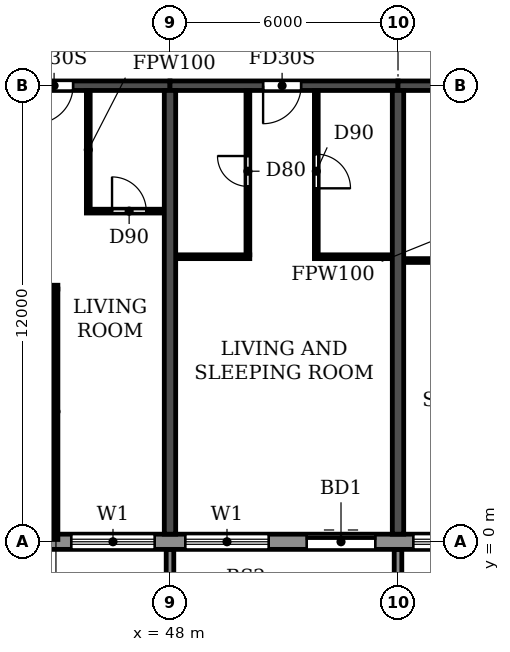
"""IFC4 building model, lengths in metres.
Left out: names, types, materials, properties, quantities, classifications, styles, units other than length and angle.
Written with IfcOpenShell. Run it as: python <this file> out.ifc"""

import sys

from ifc_helpers import new_model, si_unit, direction, frame, frame_2d, origin, place, context, subcontext, project, spatial, polyline, rectangle, outline, extrude, source, transform, mapped, element, fill, save


model = new_model("IFC4")
c1 = context("Model", 3, precision=1e-05, world=origin(), true_north=direction((0.0, 1.0)))
c2 = subcontext(c1, "Body", "Model", "MODEL_VIEW")
j1 = project(units=[si_unit("LENGTHUNIT", "METRE"), si_unit("PLANEANGLEUNIT", "RADIAN")], contexts=[c1])
p1 = place(None, origin())
s1 = spatial("IfcSite", under=j1, at=p1, CompositionType="ELEMENT")
p2 = place(p1, origin())
s2 = spatial("IfcBuilding", under=s1, at=p2, CompositionType="ELEMENT")
p3 = place(p2, frame((0.0, 0.0, 142.2)))
s3 = spatial("IfcBuildingStorey", under=s2, at=p3, CompositionType="ELEMENT", Elevation=142.2)
for number, where, z_axis, x_axis in (
    (1, (48.0, 0.2, 0.0), (0.0, 0.0, 1.0), (0.0, 1.0, 0.0)),
    (2, (54.0, 0.2, 0.0), (0.0, 0.0, 1.0), (0.0, 1.0, 0.0)),
):
    element("IfcWall", number, at=place(p3, frame(where, z_axis=z_axis, x_axis=x_axis)), inside=s3, PredefinedType="SHEAR", context=c2, shape_type="SweptSolid", body=[
        extrude(rectangle(XDim=11.675, YDim=0.3, at=frame_2d((5.837, 0.0))), origin(), (0.0, 0.0, 1.0), 3.07),
    ])
p4 = place(p3, frame((42.0, 12.0, 0.0), z_axis=(0.0, 0.0, 1.0), x_axis=(1.0, 0.0, 0.0)))
e3 = element("IfcWall", 3, at=p4, inside=s3, PredefinedType="SHEAR", context=c2, shape_type="SweptSolid", body=[
    extrude(rectangle(XDim=6.0, YDim=0.25, at=frame_2d((3.0, 0.0))), origin(), (0.0, 0.0, 1.0), 2.47),
])
p5 = place(p4, frame((2.45, 0.0, 0.0)))
e4 = element("IfcOpeningElement", 4, at=p5, cuts=e3, PredefinedType="OPENING", context=c2, shape_type="SweptSolid", body=[
    extrude(rectangle(XDim=1.0, YDim=2.1, at=frame_2d((0.5, 1.05))), frame((0.0, 0.135, 0.0), z_axis=(0.0, -1.0, 0.0), x_axis=(1.0, 0.0, 0.0)), (0.0, 0.0, 1.0), 0.27),
])
p6 = place(p3, frame((48.0, 12.0, 0.0), z_axis=(0.0, 0.0, 1.0), x_axis=(1.0, 0.0, 0.0)))
e5 = element("IfcWall", 5, at=p6, inside=s3, PredefinedType="SHEAR", context=c2, shape_type="SweptSolid", body=[
    extrude(rectangle(XDim=6.0, YDim=0.25, at=frame_2d((3.0, 0.0))), origin(), (0.0, 0.0, 1.0), 2.47),
])
p7 = place(p6, frame((2.45, 0.0, 0.0)))
e6 = element("IfcOpeningElement", 6, at=p7, cuts=e5, PredefinedType="OPENING", context=c2, shape_type="SweptSolid", body=[
    extrude(rectangle(XDim=1.0, YDim=2.1, at=frame_2d((0.5, 1.05))), frame((0.0, 0.135, 0.0), z_axis=(0.0, -1.0, 0.0), x_axis=(1.0, 0.0, 0.0)), (0.0, 0.0, 1.0), 0.27),
])
p8 = place(p3, frame((54.0, 12.0, 0.0), z_axis=(0.0, 0.0, 1.0), x_axis=(1.0, 0.0, 0.0)))
e7 = element("IfcWall", 7, at=p8, inside=s3, PredefinedType="SHEAR", context=c2, shape_type="SweptSolid", body=[
    extrude(rectangle(XDim=6.0, YDim=0.25, at=frame_2d((3.0, 0.0))), origin(), (0.0, 0.0, 1.0), 2.47),
])
p9 = place(p8, frame((2.45, 0.0, 0.0)))
e8 = element("IfcOpeningElement", 8, at=p9, cuts=e7, PredefinedType="OPENING", context=c2, shape_type="SweptSolid", body=[
    extrude(rectangle(XDim=1.0, YDim=2.1, at=frame_2d((0.5, 1.05))), frame((0.0, 0.135, 0.0), z_axis=(0.0, -1.0, 0.0), x_axis=(1.0, 0.0, 0.0)), (0.0, 0.0, 1.0), 0.27),
])
p10 = place(p3, frame((16.683, 0.0, 0.0), z_axis=(0.0, 0.0, 1.0), x_axis=(1.0, 0.0, 0.0)))
e9 = element("IfcWall", 9, at=p10, inside=s3, PredefinedType="STANDARD", context=c2, shape_type="SweptSolid", body=[
    extrude(rectangle(XDim=68.634, YDim=0.4, at=frame_2d((34.317, 0.0))), origin(), (0.0, 0.0, 1.0), 3.07),
])
p11 = place(p10, frame((1.717, 0.0, 0.9)))
e10 = element("IfcOpeningElement", 10, at=p11, cuts=e9, PredefinedType="OPENING", context=c2, shape_type="SweptSolid", body=[
    extrude(rectangle(XDim=2.2, YDim=1.5, at=frame_2d((1.1, 0.75))), frame((0.0, 0.21, 0.0), z_axis=(0.0, -1.0, 0.0), x_axis=(1.0, 0.0, 0.0)), (0.0, 0.0, 1.0), 0.42),
])
p12 = place(p10, frame((4.717, 0.0, 0.9)))
e11 = element("IfcOpeningElement", 11, at=p12, cuts=e9, PredefinedType="OPENING", context=c2, shape_type="SweptSolid", body=[
    extrude(rectangle(XDim=2.2, YDim=1.5, at=frame_2d((1.1, 0.75))), frame((0.0, 0.21, 0.0), z_axis=(0.0, -1.0, 0.0), x_axis=(1.0, 0.0, 0.0)), (0.0, 0.0, 1.0), 0.42),
])
p13 = place(p10, frame((7.717, 0.0, 0.9)))
e12 = element("IfcOpeningElement", 12, at=p13, cuts=e9, PredefinedType="OPENING", context=c2, shape_type="SweptSolid", body=[
    extrude(rectangle(XDim=2.2, YDim=1.5, at=frame_2d((1.1, 0.75))), frame((0.0, 0.21, 0.0), z_axis=(0.0, -1.0, 0.0), x_axis=(1.0, 0.0, 0.0)), (0.0, 0.0, 1.0), 0.42),
])
p14 = place(p10, frame((10.717, 0.0, 0.9)))
e13 = element("IfcOpeningElement", 13, at=p14, cuts=e9, PredefinedType="OPENING", context=c2, shape_type="SweptSolid", body=[
    extrude(rectangle(XDim=2.2, YDim=1.5, at=frame_2d((1.1, 0.75))), frame((0.0, 0.21, 0.0), z_axis=(0.0, -1.0, 0.0), x_axis=(1.0, 0.0, 0.0)), (0.0, 0.0, 1.0), 0.42),
])
p15 = place(p10, frame((13.717, 0.0, 0.9)))
e14 = element("IfcOpeningElement", 14, at=p15, cuts=e9, PredefinedType="OPENING", context=c2, shape_type="SweptSolid", body=[
    extrude(rectangle(XDim=2.2, YDim=1.5, at=frame_2d((1.1, 0.75))), frame((0.0, 0.21, 0.0), z_axis=(0.0, -1.0, 0.0), x_axis=(1.0, 0.0, 0.0)), (0.0, 0.0, 1.0), 0.42),
])
p16 = place(p10, frame((16.717, 0.0, 0.9)))
e15 = element("IfcOpeningElement", 15, at=p16, cuts=e9, PredefinedType="OPENING", context=c2, shape_type="SweptSolid", body=[
    extrude(rectangle(XDim=2.2, YDim=1.5, at=frame_2d((1.1, 0.75))), frame((0.0, 0.21, 0.0), z_axis=(0.0, -1.0, 0.0), x_axis=(1.0, 0.0, 0.0)), (0.0, 0.0, 1.0), 0.42),
])
p17 = place(p10, frame((19.717, 0.0, 0.9)))
e16 = element("IfcOpeningElement", 16, at=p17, cuts=e9, PredefinedType="OPENING", context=c2, shape_type="SweptSolid", body=[
    extrude(rectangle(XDim=2.2, YDim=1.5, at=frame_2d((1.1, 0.75))), frame((0.0, 0.21, 0.0), z_axis=(0.0, -1.0, 0.0), x_axis=(1.0, 0.0, 0.0)), (0.0, 0.0, 1.0), 0.42),
])
p18 = place(p10, frame((22.717, 0.0, 0.9)))
e17 = element("IfcOpeningElement", 17, at=p18, cuts=e9, PredefinedType="OPENING", context=c2, shape_type="SweptSolid", body=[
    extrude(rectangle(XDim=2.2, YDim=1.5, at=frame_2d((1.1, 0.75))), frame((0.0, 0.21, 0.0), z_axis=(0.0, -1.0, 0.0), x_axis=(1.0, 0.0, 0.0)), (0.0, 0.0, 1.0), 0.42),
])
p19 = place(p10, frame((25.717, 0.0, 0.9)))
e18 = element("IfcOpeningElement", 18, at=p19, cuts=e9, PredefinedType="OPENING", context=c2, shape_type="SweptSolid", body=[
    extrude(rectangle(XDim=2.2, YDim=1.5, at=frame_2d((1.1, 0.75))), frame((0.0, 0.21, 0.0), z_axis=(0.0, -1.0, 0.0), x_axis=(1.0, 0.0, 0.0)), (0.0, 0.0, 1.0), 0.42),
])
p20 = place(p10, frame((28.717, 0.0, 0.9)))
e19 = element("IfcOpeningElement", 19, at=p20, cuts=e9, PredefinedType="OPENING", context=c2, shape_type="SweptSolid", body=[
    extrude(rectangle(XDim=2.2, YDim=1.5, at=frame_2d((1.1, 0.75))), frame((0.0, 0.21, 0.0), z_axis=(0.0, -1.0, 0.0), x_axis=(1.0, 0.0, 0.0)), (0.0, 0.0, 1.0), 0.42),
])
p21 = place(p10, frame((31.717, 0.0, 0.9)))
e20 = element("IfcOpeningElement", 20, at=p21, cuts=e9, PredefinedType="OPENING", context=c2, shape_type="SweptSolid", body=[
    extrude(rectangle(XDim=2.2, YDim=1.5, at=frame_2d((1.1, 0.75))), frame((0.0, 0.21, 0.0), z_axis=(0.0, -1.0, 0.0), x_axis=(1.0, 0.0, 0.0)), (0.0, 0.0, 1.0), 0.42),
])
p22 = place(p10, frame((34.917, 0.0, 0.0)))
e21 = element("IfcOpeningElement", 21, at=p22, cuts=e9, PredefinedType="OPENING", context=c2, shape_type="SweptSolid", body=[
    extrude(rectangle(XDim=1.8, YDim=2.4, at=frame_2d((0.9, 1.2))), frame((0.0, 0.21, 0.0), z_axis=(0.0, -1.0, 0.0), x_axis=(1.0, 0.0, 0.0)), (0.0, 0.0, 1.0), 0.42),
])
p23 = place(p10, frame((37.717, 0.0, 0.9)))
e22 = element("IfcOpeningElement", 22, at=p23, cuts=e9, PredefinedType="OPENING", context=c2, shape_type="SweptSolid", body=[
    extrude(rectangle(XDim=2.2, YDim=1.5, at=frame_2d((1.1, 0.75))), frame((0.0, 0.21, 0.0), z_axis=(0.0, -1.0, 0.0), x_axis=(1.0, 0.0, 0.0)), (0.0, 0.0, 1.0), 0.42),
])
p24 = place(p10, frame((40.717, 0.0, 0.9)))
e23 = element("IfcOpeningElement", 23, at=p24, cuts=e9, PredefinedType="OPENING", context=c2, shape_type="SweptSolid", body=[
    extrude(rectangle(XDim=2.2, YDim=1.5, at=frame_2d((1.1, 0.75))), frame((0.0, 0.21, 0.0), z_axis=(0.0, -1.0, 0.0), x_axis=(1.0, 0.0, 0.0)), (0.0, 0.0, 1.0), 0.42),
])
p25 = place(p10, frame((43.717, 0.0, 0.9)))
e24 = element("IfcOpeningElement", 24, at=p25, cuts=e9, PredefinedType="OPENING", context=c2, shape_type="SweptSolid", body=[
    extrude(rectangle(XDim=2.2, YDim=1.5, at=frame_2d((1.1, 0.75))), frame((0.0, 0.21, 0.0), z_axis=(0.0, -1.0, 0.0), x_axis=(1.0, 0.0, 0.0)), (0.0, 0.0, 1.0), 0.42),
])
p26 = place(p10, frame((46.917, 0.0, 0.0)))
e25 = element("IfcOpeningElement", 25, at=p26, cuts=e9, PredefinedType="OPENING", context=c2, shape_type="SweptSolid", body=[
    extrude(rectangle(XDim=1.8, YDim=2.4, at=frame_2d((0.9, 1.2))), frame((0.0, 0.21, 0.0), z_axis=(0.0, -1.0, 0.0), x_axis=(1.0, 0.0, 0.0)), (0.0, 0.0, 1.0), 0.42),
])
p27 = place(p10, frame((49.717, 0.0, 0.9)))
e26 = element("IfcOpeningElement", 26, at=p27, cuts=e9, PredefinedType="OPENING", context=c2, shape_type="SweptSolid", body=[
    extrude(rectangle(XDim=2.2, YDim=1.5, at=frame_2d((1.1, 0.75))), frame((0.0, 0.21, 0.0), z_axis=(0.0, -1.0, 0.0), x_axis=(1.0, 0.0, 0.0)), (0.0, 0.0, 1.0), 0.42),
])
p28 = place(p10, frame((52.717, 0.0, 0.9)))
e27 = element("IfcOpeningElement", 27, at=p28, cuts=e9, PredefinedType="OPENING", context=c2, shape_type="SweptSolid", body=[
    extrude(rectangle(XDim=2.2, YDim=1.5, at=frame_2d((1.1, 0.75))), frame((0.0, 0.21, 0.0), z_axis=(0.0, -1.0, 0.0), x_axis=(1.0, 0.0, 0.0)), (0.0, 0.0, 1.0), 0.42),
])
p29 = place(p10, frame((55.717, 0.0, 0.9)))
e28 = element("IfcOpeningElement", 28, at=p29, cuts=e9, PredefinedType="OPENING", context=c2, shape_type="SweptSolid", body=[
    extrude(rectangle(XDim=2.2, YDim=1.5, at=frame_2d((1.1, 0.75))), frame((0.0, 0.21, 0.0), z_axis=(0.0, -1.0, 0.0), x_axis=(1.0, 0.0, 0.0)), (0.0, 0.0, 1.0), 0.42),
])
p30 = place(p10, frame((58.717, 0.0, 0.9)))
e29 = element("IfcOpeningElement", 29, at=p30, cuts=e9, PredefinedType="OPENING", context=c2, shape_type="SweptSolid", body=[
    extrude(rectangle(XDim=2.2, YDim=1.5, at=frame_2d((1.1, 0.75))), frame((0.0, 0.21, 0.0), z_axis=(0.0, -1.0, 0.0), x_axis=(1.0, 0.0, 0.0)), (0.0, 0.0, 1.0), 0.42),
])
p31 = place(p10, frame((61.717, 0.0, 0.9)))
e30 = element("IfcOpeningElement", 30, at=p31, cuts=e9, PredefinedType="OPENING", context=c2, shape_type="SweptSolid", body=[
    extrude(rectangle(XDim=2.2, YDim=1.5, at=frame_2d((1.1, 0.75))), frame((0.0, 0.21, 0.0), z_axis=(0.0, -1.0, 0.0), x_axis=(1.0, 0.0, 0.0)), (0.0, 0.0, 1.0), 0.42),
])
p32 = place(p10, frame((64.717, 0.0, 0.9)))
e31 = element("IfcOpeningElement", 31, at=p32, cuts=e9, PredefinedType="OPENING", context=c2, shape_type="SweptSolid", body=[
    extrude(rectangle(XDim=2.2, YDim=1.5, at=frame_2d((1.1, 0.75))), frame((0.0, 0.21, 0.0), z_axis=(0.0, -1.0, 0.0), x_axis=(1.0, 0.0, 0.0)), (0.0, 0.0, 1.0), 0.42),
])
m1 = source(origin(), c2, "Body", "SweptSolid", [
    extrude(outline(polyline([(0.0, 0.0), (0.2, 0.0), (0.2, 1.65), (0.0, 1.65), (0.0, 0.0)])), origin(), (0.0, 0.0, 1.0), 3.1),
])
for number, where in (
    (32, (47.9, -1.85, 0.0)),
    (33, (53.9, -1.85, 0.0)),
):
    element("IfcWall", number, at=place(p3, frame(where)), inside=s3, PredefinedType="STANDARD", context=c2, shape_type="MappedRepresentation", body=[
        mapped(m1, transform((0.0, 0.0, 0.0))),
    ])
p33 = place(p3, frame((42.16, 6.7, 0.0), z_axis=(0.0, 0.0, 1.0), x_axis=(1.0, 0.0, 0.0)))
e34 = element("IfcWall", 34, at=p33, inside=s3, PredefinedType="PARTITIONING", context=c2, shape_type="SweptSolid", body=[
    extrude(rectangle(XDim=2.89, YDim=0.1, at=frame_2d((1.445, 0.0))), origin(), (0.0, 0.0, 1.0), 3.07),
])
p34 = place(p33, frame((1.44, 0.0, 0.0)))
e35 = element("IfcOpeningElement", 35, at=p34, cuts=e34, PredefinedType="OPENING", context=c2, shape_type="SweptSolid", body=[
    extrude(rectangle(XDim=0.9, YDim=2.1, at=frame_2d((0.45, 1.05))), frame((0.0, 0.06, 0.0), z_axis=(0.0, -1.0, 0.0), x_axis=(1.0, 0.0, 0.0)), (0.0, 0.0, 1.0), 0.12),
])
for number, where, z_axis, x_axis in (
    (36, (54.16, 7.4, 0.0), (0.0, 0.0, 1.0), (1.0, 0.0, 0.0)),
    (37, (48.16, 7.5, 0.0), (0.0, 0.0, 1.0), (1.0, 0.0, 0.0)),
):
    element("IfcWall", number, at=place(p3, frame(where, z_axis=z_axis, x_axis=x_axis)), inside=s3, PredefinedType="PARTITIONING", context=c2, shape_type="SweptSolid", body=[
        extrude(rectangle(XDim=1.94, YDim=0.1, at=frame_2d((0.97, 0.0))), origin(), (0.0, 0.0, 1.0), 3.07),
    ])
p35 = place(p3, frame((51.8, 7.5, 0.0), z_axis=(0.0, 0.0, 1.0), x_axis=(1.0, 0.0, 0.0)))
e38 = element("IfcWall", 38, at=p35, inside=s3, PredefinedType="PARTITIONING", context=c2, shape_type="SweptSolid", body=[
    extrude(rectangle(XDim=2.04, YDim=0.1, at=frame_2d((1.02, 0.0))), origin(), (0.0, 0.0, 1.0), 3.07),
])
p36 = place(p3, frame((45.8, 8.7, 0.0), z_axis=(0.0, 0.0, 1.0), x_axis=(1.0, 0.0, 0.0)))
e39 = element("IfcWall", 39, at=p36, inside=s3, PredefinedType="PARTITIONING", context=c2, shape_type="SweptSolid", body=[
    extrude(rectangle(XDim=2.04, YDim=0.1, at=frame_2d((1.02, 0.0))), origin(), (0.0, 0.0, 1.0), 3.07),
])
p37 = place(p36, frame((0.675, 0.0, 0.0)))
e40 = element("IfcOpeningElement", 40, at=p37, cuts=e39, PredefinedType="OPENING", context=c2, shape_type="SweptSolid", body=[
    extrude(rectangle(XDim=0.9, YDim=2.1, at=frame_2d((0.45, 1.05))), frame((0.0, 0.06, 0.0), z_axis=(0.0, -1.0, 0.0), x_axis=(1.0, 0.0, 0.0)), (0.0, 0.0, 1.0), 0.12),
])
p38 = place(p3, frame((45.0, 0.06, 0.0), z_axis=(0.0, 0.0, 1.0), x_axis=(0.0, 1.0, 0.0)))
e41 = element("IfcWall", 41, at=p38, inside=s3, PredefinedType="PARTITIONING", context=c2, shape_type="SweptSolid", body=[
    extrude(rectangle(XDim=6.59, YDim=0.1, at=frame_2d((3.295, 0.0))), origin(), (0.0, 0.0, 1.0), 3.07),
])
p39 = place(p3, frame((45.85, 8.75, 0.0), z_axis=(0.0, 0.0, 1.0), x_axis=(0.0, 1.0, 0.0)))
e42 = element("IfcWall", 42, at=p39, inside=s3, PredefinedType="PARTITIONING", context=c2, shape_type="SweptSolid", body=[
    extrude(rectangle(XDim=3.115, YDim=0.1, at=frame_2d((1.558, 0.0))), origin(), (0.0, 0.0, 1.0), 3.07),
])
p40 = place(p3, frame((50.05, 7.55, 0.0), z_axis=(0.0, 0.0, 1.0), x_axis=(0.0, 1.0, 0.0)))
e43 = element("IfcWall", 43, at=p40, inside=s3, PredefinedType="PARTITIONING", context=c2, shape_type="SweptSolid", body=[
    extrude(rectangle(XDim=4.315, YDim=0.1, at=frame_2d((2.157, 0.0))), origin(), (0.0, 0.0, 1.0), 3.07),
])
p41 = place(p40, frame((1.8, 0.0, 0.0)))
e44 = element("IfcOpeningElement", 44, at=p41, cuts=e43, PredefinedType="OPENING", context=c2, shape_type="SweptSolid", body=[
    extrude(rectangle(XDim=0.8, YDim=2.1, at=frame_2d((0.4, 1.05))), frame((0.0, 0.06, 0.0), z_axis=(0.0, -1.0, 0.0), x_axis=(1.0, 0.0, 0.0)), (0.0, 0.0, 1.0), 0.12),
])
p42 = place(p3, frame((51.85, 7.55, 0.0), z_axis=(0.0, 0.0, 1.0), x_axis=(0.0, 1.0, 0.0)))
e45 = element("IfcWall", 45, at=p42, inside=s3, PredefinedType="PARTITIONING", context=c2, shape_type="SweptSolid", body=[
    extrude(rectangle(XDim=4.315, YDim=0.1, at=frame_2d((2.157, 0.0))), origin(), (0.0, 0.0, 1.0), 3.07),
])
p43 = place(p42, frame((1.75, 0.0, 0.0)))
e46 = element("IfcOpeningElement", 46, at=p43, cuts=e45, PredefinedType="OPENING", context=c2, shape_type="SweptSolid", body=[
    extrude(rectangle(XDim=0.9, YDim=2.1, at=frame_2d((0.45, 1.05))), frame((0.0, 0.06, 0.0), z_axis=(0.0, -1.0, 0.0), x_axis=(1.0, 0.0, 0.0)), (0.0, 0.0, 1.0), 0.12),
])
p44 = place(p20, origin())
e47 = element("IfcWindow", 47, at=p44, inside=s3, PartitioningType="DOUBLE_PANEL_HORIZONTAL", PredefinedType="WINDOW", context=c2, shape_type="SweptSolid", body=[
    extrude(rectangle(XDim=2.2, YDim=1.5, at=frame_2d((1.1, 0.75))), frame((0.0, 0.03, 0.0), z_axis=(0.0, -1.0, 0.0), x_axis=(1.0, 0.0, 0.0)), (0.0, 0.0, 1.0), 0.06),
])
fill(e19, e47)
p45 = place(p21, origin())
e48 = element("IfcWindow", 48, at=p45, inside=s3, PartitioningType="DOUBLE_PANEL_HORIZONTAL", PredefinedType="WINDOW", context=c2, shape_type="SweptSolid", body=[
    extrude(rectangle(XDim=2.2, YDim=1.5, at=frame_2d((1.1, 0.75))), frame((0.0, 0.03, 0.0), z_axis=(0.0, -1.0, 0.0), x_axis=(1.0, 0.0, 0.0)), (0.0, 0.0, 1.0), 0.06),
])
fill(e20, e48)
p46 = place(p22, origin())
e49 = element("IfcDoor", 49, at=p46, inside=s3, OperationType="DOUBLE_DOOR_SLIDING", PredefinedType="DOOR", context=c2, shape_type="SweptSolid", body=[
    extrude(rectangle(XDim=1.8, YDim=2.4, at=frame_2d((0.9, 1.2))), frame((0.0, 0.025, 0.0), z_axis=(0.0, -1.0, 0.0), x_axis=(1.0, 0.0, 0.0)), (0.0, 0.0, 1.0), 0.05),
])
fill(e21, e49)
p47 = place(p23, origin())
e50 = element("IfcWindow", 50, at=p47, inside=s3, PartitioningType="DOUBLE_PANEL_HORIZONTAL", PredefinedType="WINDOW", context=c2, shape_type="SweptSolid", body=[
    extrude(rectangle(XDim=2.2, YDim=1.5, at=frame_2d((1.1, 0.75))), frame((0.0, 0.03, 0.0), z_axis=(0.0, -1.0, 0.0), x_axis=(1.0, 0.0, 0.0)), (0.0, 0.0, 1.0), 0.06),
])
fill(e22, e50)
p48 = place(p5, frame((1.0, 0.0, 0.0), z_axis=(0.0, 0.0, 1.0), x_axis=(-1.0, 0.0, 0.0)))
e51 = element("IfcDoor", 51, at=p48, inside=s3, OperationType="SINGLE_SWING_RIGHT", PredefinedType="DOOR", context=c2, shape_type="SweptSolid", body=[
    extrude(rectangle(XDim=1.0, YDim=2.1, at=frame_2d((0.5, 1.05))), frame((0.0, 0.025, 0.0), z_axis=(0.0, -1.0, 0.0), x_axis=(1.0, 0.0, 0.0)), (0.0, 0.0, 1.0), 0.05),
])
fill(e4, e51)
p49 = place(p37, origin())
e52 = element("IfcDoor", 52, at=p49, inside=s3, OperationType="SINGLE_SWING_LEFT", PredefinedType="DOOR", context=c2, shape_type="SweptSolid", body=[
    extrude(rectangle(XDim=0.9, YDim=2.1, at=frame_2d((0.45, 1.05))), frame((0.0, 0.025, 0.0), z_axis=(0.0, -1.0, 0.0), x_axis=(1.0, 0.0, 0.0)), (0.0, 0.0, 1.0), 0.05),
])
fill(e40, e52)
p50 = place(p41, origin())
e53 = element("IfcDoor", 53, at=p50, inside=s3, OperationType="SINGLE_SWING_RIGHT", PredefinedType="DOOR", context=c2, shape_type="SweptSolid", body=[
    extrude(rectangle(XDim=0.8, YDim=2.1, at=frame_2d((0.4, 1.05))), frame((0.0, 0.025, 0.0), z_axis=(0.0, -1.0, 0.0), x_axis=(1.0, 0.0, 0.0)), (0.0, 0.0, 1.0), 0.05),
])
fill(e44, e53)
p51 = place(p7, frame((1.0, 0.0, 0.0), z_axis=(0.0, 0.0, 1.0), x_axis=(-1.0, 0.0, 0.0)))
e54 = element("IfcDoor", 54, at=p51, inside=s3, OperationType="SINGLE_SWING_RIGHT", PredefinedType="DOOR", context=c2, shape_type="SweptSolid", body=[
    extrude(rectangle(XDim=1.0, YDim=2.1, at=frame_2d((0.5, 1.05))), frame((0.0, 0.025, 0.0), z_axis=(0.0, -1.0, 0.0), x_axis=(1.0, 0.0, 0.0)), (0.0, 0.0, 1.0), 0.05),
])
fill(e6, e54)
p52 = place(p43, frame((0.9, 0.0, 0.0), z_axis=(0.0, 0.0, 1.0), x_axis=(-1.0, 0.0, 0.0)))
e55 = element("IfcDoor", 55, at=p52, inside=s3, OperationType="SINGLE_SWING_RIGHT", PredefinedType="DOOR", context=c2, shape_type="SweptSolid", body=[
    extrude(rectangle(XDim=0.9, YDim=2.1, at=frame_2d((0.45, 1.05))), frame((0.0, 0.025, 0.0), z_axis=(0.0, -1.0, 0.0), x_axis=(1.0, 0.0, 0.0)), (0.0, 0.0, 1.0), 0.05),
])
fill(e46, e55)
save(model, sys.argv[1])
